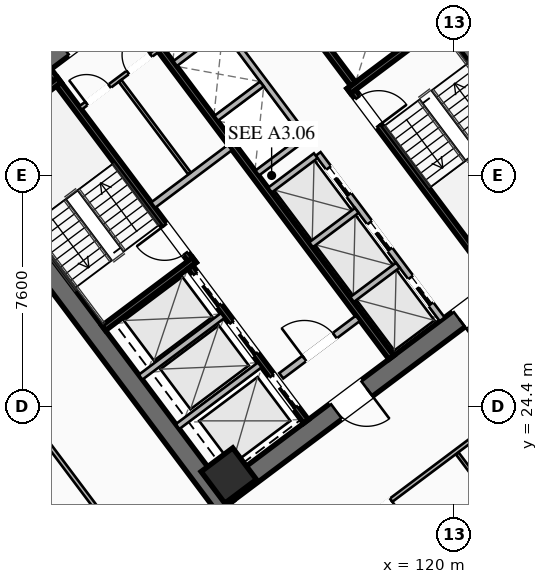
"""IFC4 building model, lengths in metres.
Left out: names, types, materials, properties, quantities, classifications, styles, units other than length and angle.
Written with IfcOpenShell. Run it as: python <this file> out.ifc"""

import sys

from ifc_helpers import new_model, si_unit, direction, frame, frame_2d, origin, origin_2d, place, context, subcontext, project, spatial, rectangle, hollow_rectangle, extrude, element, fill, save


model = new_model("IFC4")
c1 = context("Model", 3, precision=1e-05, world=origin(), true_north=direction((0.0, 1.0)))
c2 = subcontext(c1, "Body", "Model", "MODEL_VIEW")
j1 = project(units=[si_unit("LENGTHUNIT", "METRE"), si_unit("PLANEANGLEUNIT", "RADIAN")], contexts=[c1])
p1 = place(None, origin())
s1 = spatial("IfcSite", under=j1, at=p1, CompositionType="ELEMENT")
p2 = place(p1, origin())
s2 = spatial("IfcBuilding", under=s1, at=p2, CompositionType="ELEMENT")
p3 = place(p2, frame((0.0, 0.0, 95.6)))
s3 = spatial("IfcBuildingStorey", under=s2, at=p3, CompositionType="ELEMENT", Elevation=95.6)
for number, where, z_axis, x_axis in (
    (1, (112.476, 21.107, 0.0), (0.0, 0.0, 1.0), (-0.6, 0.8, 0.0)),
    (2, (115.524, 42.893, 0.0), (0.0, 0.0, 1.0), (0.6, -0.8, 0.0)),
):
    element("IfcWall", number, at=place(p3, frame(where, z_axis=z_axis, x_axis=x_axis)), inside=s3, PredefinedType="SHEAR", context=c2, shape_type="SweptSolid", body=[
        extrude(rectangle(XDim=15.6, YDim=0.65, at=frame_2d((7.8, 0.0))), origin(), (0.0, 0.0, 1.0), 3.55),
    ])
p4 = place(p3, frame((124.429, 30.478, 0.0), z_axis=(0.0, 0.0, 1.0), x_axis=(-0.799998028465, -0.600002628705, 0.0)))
e3 = element("IfcWall", 3, at=p4, inside=s3, PredefinedType="SHEAR", context=c2, shape_type="SweptSolid", body=[
    extrude(rectangle(XDim=14.86, YDim=0.65, at=frame_2d((7.43, 0.0))), origin(), (0.0, 0.0, 1.0), 3.55),
])
p5 = place(p4, frame((9.13, 0.0, 0.0)))
e4 = element("IfcOpeningElement", 4, at=p5, cuts=e3, PredefinedType="OPENING", context=c2, shape_type="SweptSolid", body=[
    extrude(rectangle(XDim=1.25, YDim=2.25, at=frame_2d((0.625, 1.125))), frame((0.0, 0.335, 0.0), z_axis=(0.0, -1.0, 0.0), x_axis=(1.0, 0.0, 0.0)), (0.0, 0.0, 1.0), 0.67),
])
p6 = place(p4, frame((4.08, 0.0, 0.0)))
e5 = element("IfcOpeningElement", 5, at=p6, cuts=e3, PredefinedType="OPENING", context=c2, shape_type="SweptSolid", body=[
    extrude(rectangle(XDim=1.25, YDim=2.25, at=frame_2d((0.625, 1.125))), frame((0.0, 0.335, 0.0), z_axis=(0.0, -1.0, 0.0), x_axis=(1.0, 0.0, 0.0)), (0.0, 0.0, 1.0), 0.67),
])
p7 = place(p3, frame((103.571, 33.522, 0.0), z_axis=(0.0, 0.0, 1.0), x_axis=(0.799998028465, 0.600002628705, 0.0)))
e6 = element("IfcWall", 6, at=p7, inside=s3, PredefinedType="SHEAR", context=c2, shape_type="SweptSolid", body=[
    extrude(rectangle(XDim=14.86, YDim=0.65, at=frame_2d((7.43, 0.0))), origin(), (0.0, 0.0, 1.0), 3.55),
])
p8 = place(p7, frame((4.48, 0.0, 0.0)))
e7 = element("IfcOpeningElement", 7, at=p8, cuts=e6, PredefinedType="OPENING", context=c2, shape_type="SweptSolid", body=[
    extrude(rectangle(XDim=1.25, YDim=2.25, at=frame_2d((0.625, 1.125))), frame((0.0, 0.335, 0.0), z_axis=(0.0, -1.0, 0.0), x_axis=(1.0, 0.0, 0.0)), (0.0, 0.0, 1.0), 0.67),
])
p9 = place(p7, frame((9.53, 0.0, 0.0)))
e8 = element("IfcOpeningElement", 8, at=p9, cuts=e6, PredefinedType="OPENING", context=c2, shape_type="SweptSolid", body=[
    extrude(rectangle(XDim=1.25, YDim=2.25, at=frame_2d((0.625, 1.125))), frame((0.0, 0.335, 0.0), z_axis=(0.0, -1.0, 0.0), x_axis=(1.0, 0.0, 0.0)), (0.0, 0.0, 1.0), 0.67),
])
p10 = place(p3, frame((112.59, 22.13, 0.0), z_axis=(0.0, 0.0, 1.0), x_axis=(0.799999996291, 0.600000004945, 0.0)))
e9 = element("IfcColumn", 9, at=p10, inside=s3, PredefinedType="COLUMN", context=c2, shape_type="SweptSolid", body=[
    extrude(hollow_rectangle(XDim=1.3, YDim=1.3, WallThickness=0.05, at=origin_2d()), origin(), (0.0, 0.0, 1.0), 3.35),
])
p11 = place(p3, frame((111.44, 29.08, 0.0), z_axis=(0.0, 0.0, 1.0), x_axis=(-0.600009827119, 0.799992629566, 0.0)))
e10 = element("IfcWall", 10, at=p11, inside=s3, PredefinedType="SHEAR", context=c2, shape_type="SweptSolid", body=[
    extrude(rectangle(XDim=7.95, YDim=0.2, at=frame_2d((3.975, 0.0))), origin(), (0.0, 0.0, 1.0), 3.35),
])
p12 = place(p11, frame((0.45, 0.0, 0.0)))
e11 = element("IfcOpeningElement", 11, at=p12, cuts=e10, PredefinedType="OPENING", context=c2, shape_type="SweptSolid", body=[
    extrude(rectangle(XDim=1.15, YDim=2.2, at=frame_2d((0.575, 1.1))), frame((0.0, 0.11, 0.0), z_axis=(0.0, -1.0, 0.0), x_axis=(1.0, 0.0, 0.0)), (0.0, 0.0, 1.0), 0.22),
])
for number, where, z_axis, x_axis in (
    (12, (108.476, 26.982, 0.0), (0.0, 0.0, 1.0), (0.8, 0.6, 0.0)),
    (13, (104.036, 32.902, 0.0), (0.0, 0.0, 1.0), (0.8, 0.6, 0.0)),
):
    element("IfcWall", number, at=place(p3, frame(where, z_axis=z_axis, x_axis=x_axis)), inside=s3, PredefinedType="SHEAR", context=c2, shape_type="SweptSolid", body=[
        extrude(rectangle(XDim=3.73, YDim=0.2, at=frame_2d((1.865, 0.0))), origin(), (0.0, 0.0, 1.0), 3.35),
    ])
p13 = place(p3, frame((116.56, 34.92, 0.0), z_axis=(0.0, 0.0, 1.0), x_axis=(0.600009827119, -0.799992629566, 0.0)))
e14 = element("IfcWall", 14, at=p13, inside=s3, PredefinedType="SHEAR", context=c2, shape_type="SweptSolid", body=[
    extrude(rectangle(XDim=7.95, YDim=0.2, at=frame_2d((3.975, 0.0))), origin(), (0.0, 0.0, 1.0), 3.35),
])
p14 = place(p13, frame((0.45, 0.0, 0.0)))
e15 = element("IfcOpeningElement", 15, at=p14, cuts=e14, PredefinedType="OPENING", context=c2, shape_type="SweptSolid", body=[
    extrude(rectangle(XDim=1.15, YDim=2.2, at=frame_2d((0.575, 1.1))), frame((0.0, 0.11, 0.0), z_axis=(0.0, -1.0, 0.0), x_axis=(1.0, 0.0, 0.0)), (0.0, 0.0, 1.0), 0.22),
])
p15 = place(p3, frame((116.54, 34.78, 0.0), z_axis=(0.0, 0.0, 1.0), x_axis=(0.799984290658, 0.600020945218, 0.0)))
e16 = element("IfcWall", 16, at=p15, inside=s3, PredefinedType="SHEAR", context=c2, shape_type="SweptSolid", body=[
    extrude(rectangle(XDim=3.73, YDim=0.2, at=frame_2d((1.865, 0.0))), origin(), (0.0, 0.0, 1.0), 3.35),
])
p16 = place(p3, frame((117.938, 26.016, 0.0), z_axis=(0.0, 0.0, 1.0), x_axis=(-0.600005463273, 0.799995902516, 0.0)))
e17 = element("IfcWall", 17, at=p16, inside=s3, PredefinedType="SHEAR", context=c2, shape_type="SweptSolid", body=[
    extrude(rectangle(XDim=14.3, YDim=0.2, at=frame_2d((7.15, 0.0))), origin(), (0.0, 0.0, 1.0), 3.35),
])
p17 = place(p3, frame((110.104, 31.028, 0.0), z_axis=(0.0, 0.0, 1.0), x_axis=(0.800018601094, 0.59997519774, 0.0)))
e18 = element("IfcWall", 18, at=p17, inside=s3, PredefinedType="SOLIDWALL", context=c2, shape_type="SweptSolid", body=[
    extrude(rectangle(XDim=3.15, YDim=0.22, at=frame_2d((1.575, 0.0))), origin(), (0.0, 0.0, 1.0), 2.703),
])
p18 = place(p3, frame((114.316, 25.412, 0.0), z_axis=(0.0, 0.0, 1.0), x_axis=(0.800018601094, 0.59997519774, 0.0)))
e19 = element("IfcWall", 19, at=p18, inside=s3, PredefinedType="SOLIDWALL", context=c2, shape_type="SweptSolid", body=[
    extrude(rectangle(XDim=3.15, YDim=0.22, at=frame_2d((1.575, 0.0))), origin(), (0.0, 0.0, 1.0), 2.703),
])
p19 = place(p18, frame((0.95, 0.0, 0.0)))
e20 = element("IfcOpeningElement", 20, at=p19, cuts=e19, PredefinedType="OPENING", context=c2, shape_type="SweptSolid", body=[
    extrude(rectangle(XDim=1.25, YDim=2.25, at=frame_2d((0.625, 1.125))), frame((0.0, 0.12, 0.0), z_axis=(0.0, -1.0, 0.0), x_axis=(1.0, 0.0, 0.0)), (0.0, 0.0, 1.0), 0.24),
])
p20 = place(p3, frame((115.13, 23.91, 0.0), z_axis=(0.0, 0.0, 1.0), x_axis=(-0.599975393228, 0.800018454488, 0.0)))
e21 = element("IfcWall", 21, at=p20, inside=s3, PredefinedType="SHEAR", context=c2, shape_type="SweptSolid", body=[
    extrude(rectangle(XDim=6.35, YDim=0.2, at=frame_2d((3.175, 0.0))), origin(), (0.0, 0.0, 1.0), 3.35),
])
p21 = place(p20, frame((4.775, 0.0, 0.0)))
e22 = element("IfcOpeningElement", 22, at=p21, cuts=e21, PredefinedType="OPENING", context=c2, shape_type="SweptSolid", body=[
    extrude(rectangle(XDim=1.3, YDim=2.25, at=frame_2d((0.65, 1.125))), frame((0.0, 0.11, 0.0), z_axis=(0.0, -1.0, 0.0), x_axis=(1.0, 0.0, 0.0)), (0.0, 0.0, 1.0), 0.22),
])
p22 = place(p20, frame((2.775, 0.0, 0.0)))
e23 = element("IfcOpeningElement", 23, at=p22, cuts=e21, PredefinedType="OPENING", context=c2, shape_type="SweptSolid", body=[
    extrude(rectangle(XDim=1.3, YDim=2.25, at=frame_2d((0.65, 1.125))), frame((0.0, 0.11, 0.0), z_axis=(0.0, -1.0, 0.0), x_axis=(1.0, 0.0, 0.0)), (0.0, 0.0, 1.0), 0.22),
])
p23 = place(p20, frame((0.575, 0.0, 0.0)))
e24 = element("IfcOpeningElement", 24, at=p23, cuts=e21, PredefinedType="OPENING", context=c2, shape_type="SweptSolid", body=[
    extrude(rectangle(XDim=1.3, YDim=2.25, at=frame_2d((0.65, 1.125))), frame((0.0, 0.11, 0.0), z_axis=(0.0, -1.0, 0.0), x_axis=(1.0, 0.0, 0.0)), (0.0, 0.0, 1.0), 0.22),
])
for number, where, z_axis, x_axis in (
    (25, (110.906, 23.742, 0.0), (0.0, 0.0, 1.0), (0.8, 0.6, 0.0)),
    (26, (109.688, 25.366, 0.0), (0.0, 0.0, 1.0), (0.8, 0.6, 0.0)),
):
    element("IfcWall", number, at=place(p3, frame(where, z_axis=z_axis, x_axis=x_axis)), inside=s3, PredefinedType="SOLIDWALL", context=c2, shape_type="SweptSolid", body=[
        extrude(rectangle(XDim=3.38, YDim=0.2, at=frame_2d((1.69, 0.0))), origin(), (0.0, 0.0, 1.0), 3.35),
    ])
p24 = place(p3, frame((112.87, 40.09, 0.0), z_axis=(0.0, 0.0, 1.0), x_axis=(0.599975393228, -0.800018454488, 0.0)))
e27 = element("IfcWall", 27, at=p24, inside=s3, PredefinedType="SHEAR", context=c2, shape_type="SweptSolid", body=[
    extrude(rectangle(XDim=6.35, YDim=0.2, at=frame_2d((3.175, 0.0))), origin(), (0.0, 0.0, 1.0), 3.35),
])
p25 = place(p3, frame((107.71, 34.22, 0.0), z_axis=(0.0, 0.0, 1.0), x_axis=(0.799981399002, 0.60002480053, 0.0)))
e28 = element("IfcWall", 28, at=p25, inside=s3, PredefinedType="PARTITIONING", context=c2, shape_type="SweptSolid", body=[
    extrude(rectangle(XDim=3.15, YDim=0.135, at=frame_2d((1.575, 0.0))), origin(), (0.0, 0.0, 1.0), 2.703),
])
p26 = place(p25, frame((0.25, 0.0, 0.0)))
e29 = element("IfcOpeningElement", 29, at=p26, cuts=e28, PredefinedType="OPENING", context=c2, shape_type="SweptSolid", body=[
    extrude(rectangle(XDim=0.95, YDim=2.05, at=frame_2d((0.475, 1.025))), frame((0.0, 0.077, 0.0), z_axis=(0.0, -1.0, 0.0), x_axis=(1.0, 0.0, 0.0)), (0.0, 0.0, 1.0), 0.155),
])
p27 = place(p25, frame((1.95, 0.0, 0.0)))
e30 = element("IfcOpeningElement", 30, at=p27, cuts=e28, PredefinedType="OPENING", context=c2, shape_type="SweptSolid", body=[
    extrude(rectangle(XDim=0.95, YDim=2.05, at=frame_2d((0.475, 1.025))), frame((0.0, 0.077, 0.0), z_axis=(0.0, -1.0, 0.0), x_axis=(1.0, 0.0, 0.0)), (0.0, 0.0, 1.0), 0.155),
])
p28 = place(p3, frame((111.296, 32.072, 0.0), z_axis=(0.0, 0.0, 1.0), x_axis=(-0.59995887973, 0.800030838552, 0.0)))
e31 = element("IfcWall", 31, at=p28, inside=s3, PredefinedType="PARTITIONING", context=c2, shape_type="SweptSolid", body=[
    extrude(rectangle(XDim=3.8, YDim=0.11, at=frame_2d((1.9, 0.0))), origin(), (0.0, 0.0, 1.0), 2.703),
])
p29 = place(p3, frame((119.61, 27.27, 0.0), z_axis=(0.0, 0.0, 1.0), x_axis=(-0.600011488909, 0.79999138319, 0.0)))
e32 = element("IfcWall", 32, at=p29, inside=s3, PredefinedType="SOLIDWALL", context=c2, shape_type="SweptSolid", body=[
    extrude(rectangle(XDim=6.8, YDim=0.2, at=frame_2d((3.4, 0.0))), origin(), (0.0, 0.0, 1.0), 3.35),
])
p30 = place(p29, frame((0.625, 0.0, 0.0)))
e33 = element("IfcOpeningElement", 33, at=p30, cuts=e32, PredefinedType="OPENING", context=c2, shape_type="SweptSolid", body=[
    extrude(rectangle(XDim=1.1, YDim=2.2, at=frame_2d((0.55, 1.1))), frame((0.0, 0.11, 0.0), z_axis=(0.0, -1.0, 0.0), x_axis=(1.0, 0.0, 0.0)), (0.0, 0.0, 1.0), 0.22),
])
p31 = place(p29, frame((2.875, 0.0, 0.0)))
e34 = element("IfcOpeningElement", 34, at=p31, cuts=e32, PredefinedType="OPENING", context=c2, shape_type="SweptSolid", body=[
    extrude(rectangle(XDim=1.1, YDim=2.2, at=frame_2d((0.55, 1.1))), frame((0.0, 0.11, 0.0), z_axis=(0.0, -1.0, 0.0), x_axis=(1.0, 0.0, 0.0)), (0.0, 0.0, 1.0), 0.22),
])
p32 = place(p29, frame((5.125, 0.0, 0.0)))
e35 = element("IfcOpeningElement", 35, at=p32, cuts=e32, PredefinedType="OPENING", context=c2, shape_type="SweptSolid", body=[
    extrude(rectangle(XDim=1.1, YDim=2.2, at=frame_2d((0.55, 1.1))), frame((0.0, 0.11, 0.0), z_axis=(0.0, -1.0, 0.0), x_axis=(1.0, 0.0, 0.0)), (0.0, 0.0, 1.0), 0.22),
])
p33 = place(p3, frame((116.646, 27.922, 0.0), z_axis=(0.0, 0.0, 1.0), x_axis=(0.8, 0.6, 0.0)))
e36 = element("IfcWall", 36, at=p33, inside=s3, PredefinedType="SOLIDWALL", context=c2, shape_type="SweptSolid", body=[
    extrude(rectangle(XDim=1.88, YDim=0.2, at=frame_2d((0.94, 0.0))), origin(), (0.0, 0.0, 1.0), 3.35),
])
p34 = place(p3, frame((115.296, 29.722, 0.0), z_axis=(0.0, 0.0, 1.0), x_axis=(0.799984418148, 0.600020775241, 0.0)))
e37 = element("IfcWall", 37, at=p34, inside=s3, PredefinedType="SOLIDWALL", context=c2, shape_type="SweptSolid", body=[
    extrude(rectangle(XDim=1.88, YDim=0.2, at=frame_2d((0.94, 0.0))), origin(), (0.0, 0.0, 1.0), 3.35),
])
p35 = place(p3, frame((113.946, 31.522, 0.0), z_axis=(0.0, 0.0, 1.0), x_axis=(0.8, 0.6, 0.0)))
e38 = element("IfcWall", 38, at=p35, inside=s3, PredefinedType="SOLIDWALL", context=c2, shape_type="SweptSolid", body=[
    extrude(rectangle(XDim=1.88, YDim=0.2, at=frame_2d((0.94, 0.0))), origin(), (0.0, 0.0, 1.0), 3.35),
])
p36 = place(p3, frame((115.11, 33.27, 0.0), z_axis=(0.0, 0.0, 1.0), x_axis=(-0.600011488909, 0.79999138319, 0.0)))
e39 = element("IfcWall", 39, at=p36, inside=s3, PredefinedType="SOLIDWALL", context=c2, shape_type="SweptSolid", body=[
    extrude(rectangle(XDim=6.8, YDim=0.2, at=frame_2d((3.4, 0.0))), origin(), (0.0, 0.0, 1.0), 3.35),
])
p37 = place(p3, frame((113.526, 32.082, 0.0), z_axis=(0.0, 0.0, 1.0), x_axis=(0.800046745961, 0.599937666993, 0.0)))
e40 = element("IfcWall", 40, at=p37, inside=s3, PredefinedType="SOLIDWALL", context=c2, shape_type="SweptSolid", body=[
    extrude(rectangle(XDim=1.88, YDim=0.2, at=frame_2d((0.94, 0.0))), origin(), (0.0, 0.0, 1.0), 3.35),
])
p38 = place(p3, frame((112.176, 33.882, 0.0), z_axis=(0.0, 0.0, 1.0), x_axis=(0.8, 0.6, 0.0)))
e41 = element("IfcWall", 41, at=p38, inside=s3, PredefinedType="SOLIDWALL", context=c2, shape_type="SweptSolid", body=[
    extrude(rectangle(XDim=1.88, YDim=0.2, at=frame_2d((0.94, 0.0))), origin(), (0.0, 0.0, 1.0), 3.35),
])
p39 = place(p3, frame((110.826, 35.682, 0.0), z_axis=(0.0, 0.0, 1.0), x_axis=(0.799984418148, 0.600020775241, 0.0)))
e42 = element("IfcWall", 42, at=p39, inside=s3, PredefinedType="SOLIDWALL", context=c2, shape_type="SweptSolid", body=[
    extrude(rectangle(XDim=1.88, YDim=0.2, at=frame_2d((0.94, 0.0))), origin(), (0.0, 0.0, 1.0), 3.35),
])
p40 = place(p3, frame((98.276, 34.332, 0.0), z_axis=(0.0, 0.0, 1.0), x_axis=(0.800003113347, 0.599995848849, 0.0)))
e43 = element("IfcWall", 43, at=p40, inside=s3, PredefinedType="PARTITIONING", context=c2, shape_type="SweptSolid", body=[
    extrude(rectangle(XDim=28.23, YDim=0.135, at=frame_2d((14.115, 0.0))), origin(), (0.0, 0.0, 1.0), 2.703),
])
p41 = place(p40, frame((0.3, 0.0, 0.0)))
e44 = element("IfcOpeningElement", 44, at=p41, cuts=e43, PredefinedType="OPENING", context=c2, shape_type="SweptSolid", body=[
    extrude(rectangle(XDim=0.95, YDim=2.05, at=frame_2d((0.475, 1.025))), frame((0.0, 0.077, 0.0), z_axis=(0.0, -1.0, 0.0), x_axis=(1.0, 0.0, 0.0)), (0.0, 0.0, 1.0), 0.155),
])
p42 = place(p40, frame((11.023, 0.0, 0.0)))
e45 = element("IfcOpeningElement", 45, at=p42, cuts=e43, PredefinedType="OPENING", context=c2, shape_type="SweptSolid", body=[
    extrude(rectangle(XDim=0.95, YDim=2.05, at=frame_2d((0.475, 1.025))), frame((0.0, 0.077, 0.0), z_axis=(0.0, -1.0, 0.0), x_axis=(1.0, 0.0, 0.0)), (0.0, 0.0, 1.0), 0.155),
])
p43 = place(p40, frame((26.98, 0.0, 0.0)))
e46 = element("IfcOpeningElement", 46, at=p43, cuts=e43, PredefinedType="OPENING", context=c2, shape_type="SweptSolid", body=[
    extrude(rectangle(XDim=0.95, YDim=2.05, at=frame_2d((0.475, 1.025))), frame((0.0, 0.077, 0.0), z_axis=(0.0, -1.0, 0.0), x_axis=(1.0, 0.0, 0.0)), (0.0, 0.0, 1.0), 0.155),
])
p44 = place(p3, frame((134.18, 33.51, 0.0), z_axis=(0.0, 0.0, 1.0), x_axis=(-0.8, -0.6, 0.0)))
e47 = element("IfcWall", 47, at=p44, inside=s3, PredefinedType="PARTITIONING", context=c2, shape_type="SweptSolid", body=[
    extrude(rectangle(XDim=28.23, YDim=0.135, at=frame_2d((14.115, 0.0))), origin(), (0.0, 0.0, 1.0), 2.703),
])
p45 = place(p44, frame((26.9, 0.0, 0.0)))
e48 = element("IfcOpeningElement", 48, at=p45, cuts=e47, PredefinedType="OPENING", context=c2, shape_type="SweptSolid", body=[
    extrude(rectangle(XDim=0.95, YDim=2.05, at=frame_2d((0.475, 1.025))), frame((0.0, 0.077, 0.0), z_axis=(0.0, -1.0, 0.0), x_axis=(1.0, 0.0, 0.0)), (0.0, 0.0, 1.0), 0.155),
])
p46 = place(p44, frame((20.314, 0.0, 0.0)))
e49 = element("IfcOpeningElement", 49, at=p46, cuts=e47, PredefinedType="OPENING", context=c2, shape_type="SweptSolid", body=[
    extrude(rectangle(XDim=0.95, YDim=2.05, at=frame_2d((0.475, 1.025))), frame((0.0, 0.077, 0.0), z_axis=(0.0, -1.0, 0.0), x_axis=(1.0, 0.0, 0.0)), (0.0, 0.0, 1.0), 0.155),
])
p47 = place(p44, frame((0.38, 0.0, 0.0)))
e50 = element("IfcOpeningElement", 50, at=p47, cuts=e47, PredefinedType="OPENING", context=c2, shape_type="SweptSolid", body=[
    extrude(rectangle(XDim=0.95, YDim=2.05, at=frame_2d((0.475, 1.025))), frame((0.0, 0.077, 0.0), z_axis=(0.0, -1.0, 0.0), x_axis=(1.0, 0.0, 0.0)), (0.0, 0.0, 1.0), 0.155),
])
p48 = place(p3, frame((125.448, 15.736, 0.0), z_axis=(0.0, 0.0, 1.0), x_axis=(-0.600013167126, 0.799990124486, 0.0)))
e51 = element("IfcWall", 51, at=p48, inside=s3, PredefinedType="PARTITIONING", context=c2, shape_type="SweptSolid", body=[
    extrude(rectangle(XDim=8.9, YDim=0.11, at=frame_2d((4.45, 0.0))), origin(), (0.0, 0.0, 1.0), 2.703),
])
p49 = place(p3, frame((111.548, 16.636, 0.0), z_axis=(0.0, 0.0, 1.0), x_axis=(-0.600001772333, 0.799998670747, 0.0)))
e52 = element("IfcWall", 52, at=p49, inside=s3, PredefinedType="PARTITIONING", context=c2, shape_type="SweptSolid", body=[
    extrude(rectangle(XDim=22.04, YDim=0.135, at=frame_2d((11.02, 0.0))), origin(), (0.0, 0.0, 1.0), 2.703),
])
p50 = place(p49, frame((20.79, 0.0, 0.0)))
e53 = element("IfcOpeningElement", 53, at=p50, cuts=e52, PredefinedType="OPENING", context=c2, shape_type="SweptSolid", body=[
    extrude(rectangle(XDim=0.95, YDim=2.05, at=frame_2d((0.475, 1.025))), frame((0.0, 0.077, 0.0), z_axis=(0.0, -1.0, 0.0), x_axis=(1.0, 0.0, 0.0)), (0.0, 0.0, 1.0), 0.155),
])
p51 = place(p5, origin())
e54 = element("IfcDoor", 54, at=p51, inside=s3, OperationType="SINGLE_SWING_LEFT", PredefinedType="DOOR", context=c2, shape_type="SweptSolid", body=[
    extrude(rectangle(XDim=1.25, YDim=2.25, at=frame_2d((0.625, 1.125))), frame((0.0, 0.025, 0.0), z_axis=(0.0, -1.0, 0.0), x_axis=(1.0, 0.0, 0.0)), (0.0, 0.0, 1.0), 0.05),
])
fill(e4, e54)
p52 = place(p6, origin())
e55 = element("IfcDoor", 55, at=p52, inside=s3, OperationType="SINGLE_SWING_RIGHT", PredefinedType="DOOR", context=c2, shape_type="SweptSolid", body=[
    extrude(rectangle(XDim=1.25, YDim=2.25, at=frame_2d((0.625, 1.125))), frame((0.0, 0.025, 0.0), z_axis=(0.0, -1.0, 0.0), x_axis=(1.0, 0.0, 0.0)), (0.0, 0.0, 1.0), 0.05),
])
fill(e5, e55)
p53 = place(p12, origin())
e56 = element("IfcDoor", 56, at=p53, inside=s3, OperationType="SINGLE_SWING_RIGHT", PredefinedType="DOOR", context=c2, shape_type="SweptSolid", body=[
    extrude(rectangle(XDim=1.15, YDim=2.2, at=frame_2d((0.575, 1.1))), frame((0.0, 0.025, 0.0), z_axis=(0.0, -1.0, 0.0), x_axis=(1.0, 0.0, 0.0)), (0.0, 0.0, 1.0), 0.05),
])
fill(e11, e56)
p54 = place(p14, origin())
e57 = element("IfcDoor", 57, at=p54, inside=s3, OperationType="SINGLE_SWING_RIGHT", PredefinedType="DOOR", context=c2, shape_type="SweptSolid", body=[
    extrude(rectangle(XDim=1.15, YDim=2.2, at=frame_2d((0.575, 1.1))), frame((0.0, 0.025, 0.0), z_axis=(0.0, -1.0, 0.0), x_axis=(1.0, 0.0, 0.0)), (0.0, 0.0, 1.0), 0.05),
])
fill(e15, e57)
p55 = place(p19, origin())
e58 = element("IfcDoor", 58, at=p55, inside=s3, OperationType="SINGLE_SWING_LEFT", PredefinedType="DOOR", context=c2, shape_type="SweptSolid", body=[
    extrude(rectangle(XDim=1.25, YDim=2.25, at=frame_2d((0.625, 1.125))), frame((0.0, 0.025, 0.0), z_axis=(0.0, -1.0, 0.0), x_axis=(1.0, 0.0, 0.0)), (0.0, 0.0, 1.0), 0.05),
])
fill(e20, e58)
p56 = place(p26, origin())
e59 = element("IfcDoor", 59, at=p56, inside=s3, OperationType="SINGLE_SWING_LEFT", PredefinedType="DOOR", context=c2, shape_type="SweptSolid", body=[
    extrude(rectangle(XDim=0.95, YDim=2.05, at=frame_2d((0.475, 1.025))), frame((0.0, 0.025, 0.0), z_axis=(0.0, -1.0, 0.0), x_axis=(1.0, 0.0, 0.0)), (0.0, 0.0, 1.0), 0.05),
])
fill(e29, e59)
p57 = place(p27, origin())
e60 = element("IfcDoor", 60, at=p57, inside=s3, OperationType="SINGLE_SWING_RIGHT", PredefinedType="DOOR", context=c2, shape_type="SweptSolid", body=[
    extrude(rectangle(XDim=0.95, YDim=2.05, at=frame_2d((0.475, 1.025))), frame((0.0, 0.025, 0.0), z_axis=(0.0, -1.0, 0.0), x_axis=(1.0, 0.0, 0.0)), (0.0, 0.0, 1.0), 0.05),
])
fill(e30, e60)
p58 = place(p46, origin())
e61 = element("IfcDoor", 61, at=p58, inside=s3, OperationType="SINGLE_SWING_LEFT", PredefinedType="DOOR", context=c2, shape_type="SweptSolid", body=[
    extrude(rectangle(XDim=0.95, YDim=2.05, at=frame_2d((0.475, 1.025))), frame((0.0, 0.025, 0.0), z_axis=(0.0, -1.0, 0.0), x_axis=(1.0, 0.0, 0.0)), (0.0, 0.0, 1.0), 0.05),
])
fill(e49, e61)
p59 = place(p21, origin())
e62 = element("IfcDoor", 62, at=p59, inside=s3, OperationType="SLIDING_TO_LEFT", PredefinedType="DOOR", context=c2, shape_type="SweptSolid", body=[
    extrude(rectangle(XDim=1.3, YDim=2.25, at=frame_2d((0.65, 1.125))), frame((0.0, 0.025, 0.0), z_axis=(0.0, -1.0, 0.0), x_axis=(1.0, 0.0, 0.0)), (0.0, 0.0, 1.0), 0.05),
])
fill(e22, e62)
p60 = place(p22, origin())
e63 = element("IfcDoor", 63, at=p60, inside=s3, OperationType="SLIDING_TO_LEFT", PredefinedType="DOOR", context=c2, shape_type="SweptSolid", body=[
    extrude(rectangle(XDim=1.3, YDim=2.25, at=frame_2d((0.65, 1.125))), frame((0.0, 0.025, 0.0), z_axis=(0.0, -1.0, 0.0), x_axis=(1.0, 0.0, 0.0)), (0.0, 0.0, 1.0), 0.05),
])
fill(e23, e63)
p61 = place(p23, origin())
e64 = element("IfcDoor", 64, at=p61, inside=s3, OperationType="SLIDING_TO_LEFT", PredefinedType="DOOR", context=c2, shape_type="SweptSolid", body=[
    extrude(rectangle(XDim=1.3, YDim=2.25, at=frame_2d((0.65, 1.125))), frame((0.0, 0.025, 0.0), z_axis=(0.0, -1.0, 0.0), x_axis=(1.0, 0.0, 0.0)), (0.0, 0.0, 1.0), 0.05),
])
fill(e24, e64)
p62 = place(p30, origin())
e65 = element("IfcDoor", 65, at=p62, inside=s3, OperationType="SLIDING_TO_LEFT", PredefinedType="DOOR", context=c2, shape_type="SweptSolid", body=[
    extrude(rectangle(XDim=1.1, YDim=2.2, at=frame_2d((0.55, 1.1))), frame((0.0, 0.025, 0.0), z_axis=(0.0, -1.0, 0.0), x_axis=(1.0, 0.0, 0.0)), (0.0, 0.0, 1.0), 0.05),
])
fill(e33, e65)
p63 = place(p31, origin())
e66 = element("IfcDoor", 66, at=p63, inside=s3, OperationType="SLIDING_TO_LEFT", PredefinedType="DOOR", context=c2, shape_type="SweptSolid", body=[
    extrude(rectangle(XDim=1.1, YDim=2.2, at=frame_2d((0.55, 1.1))), frame((0.0, 0.025, 0.0), z_axis=(0.0, -1.0, 0.0), x_axis=(1.0, 0.0, 0.0)), (0.0, 0.0, 1.0), 0.05),
])
fill(e34, e66)
p64 = place(p32, origin())
e67 = element("IfcDoor", 67, at=p64, inside=s3, OperationType="SLIDING_TO_LEFT", PredefinedType="DOOR", context=c2, shape_type="SweptSolid", body=[
    extrude(rectangle(XDim=1.1, YDim=2.2, at=frame_2d((0.55, 1.1))), frame((0.0, 0.025, 0.0), z_axis=(0.0, -1.0, 0.0), x_axis=(1.0, 0.0, 0.0)), (0.0, 0.0, 1.0), 0.05),
])
fill(e35, e67)
save(model, sys.argv[1])
